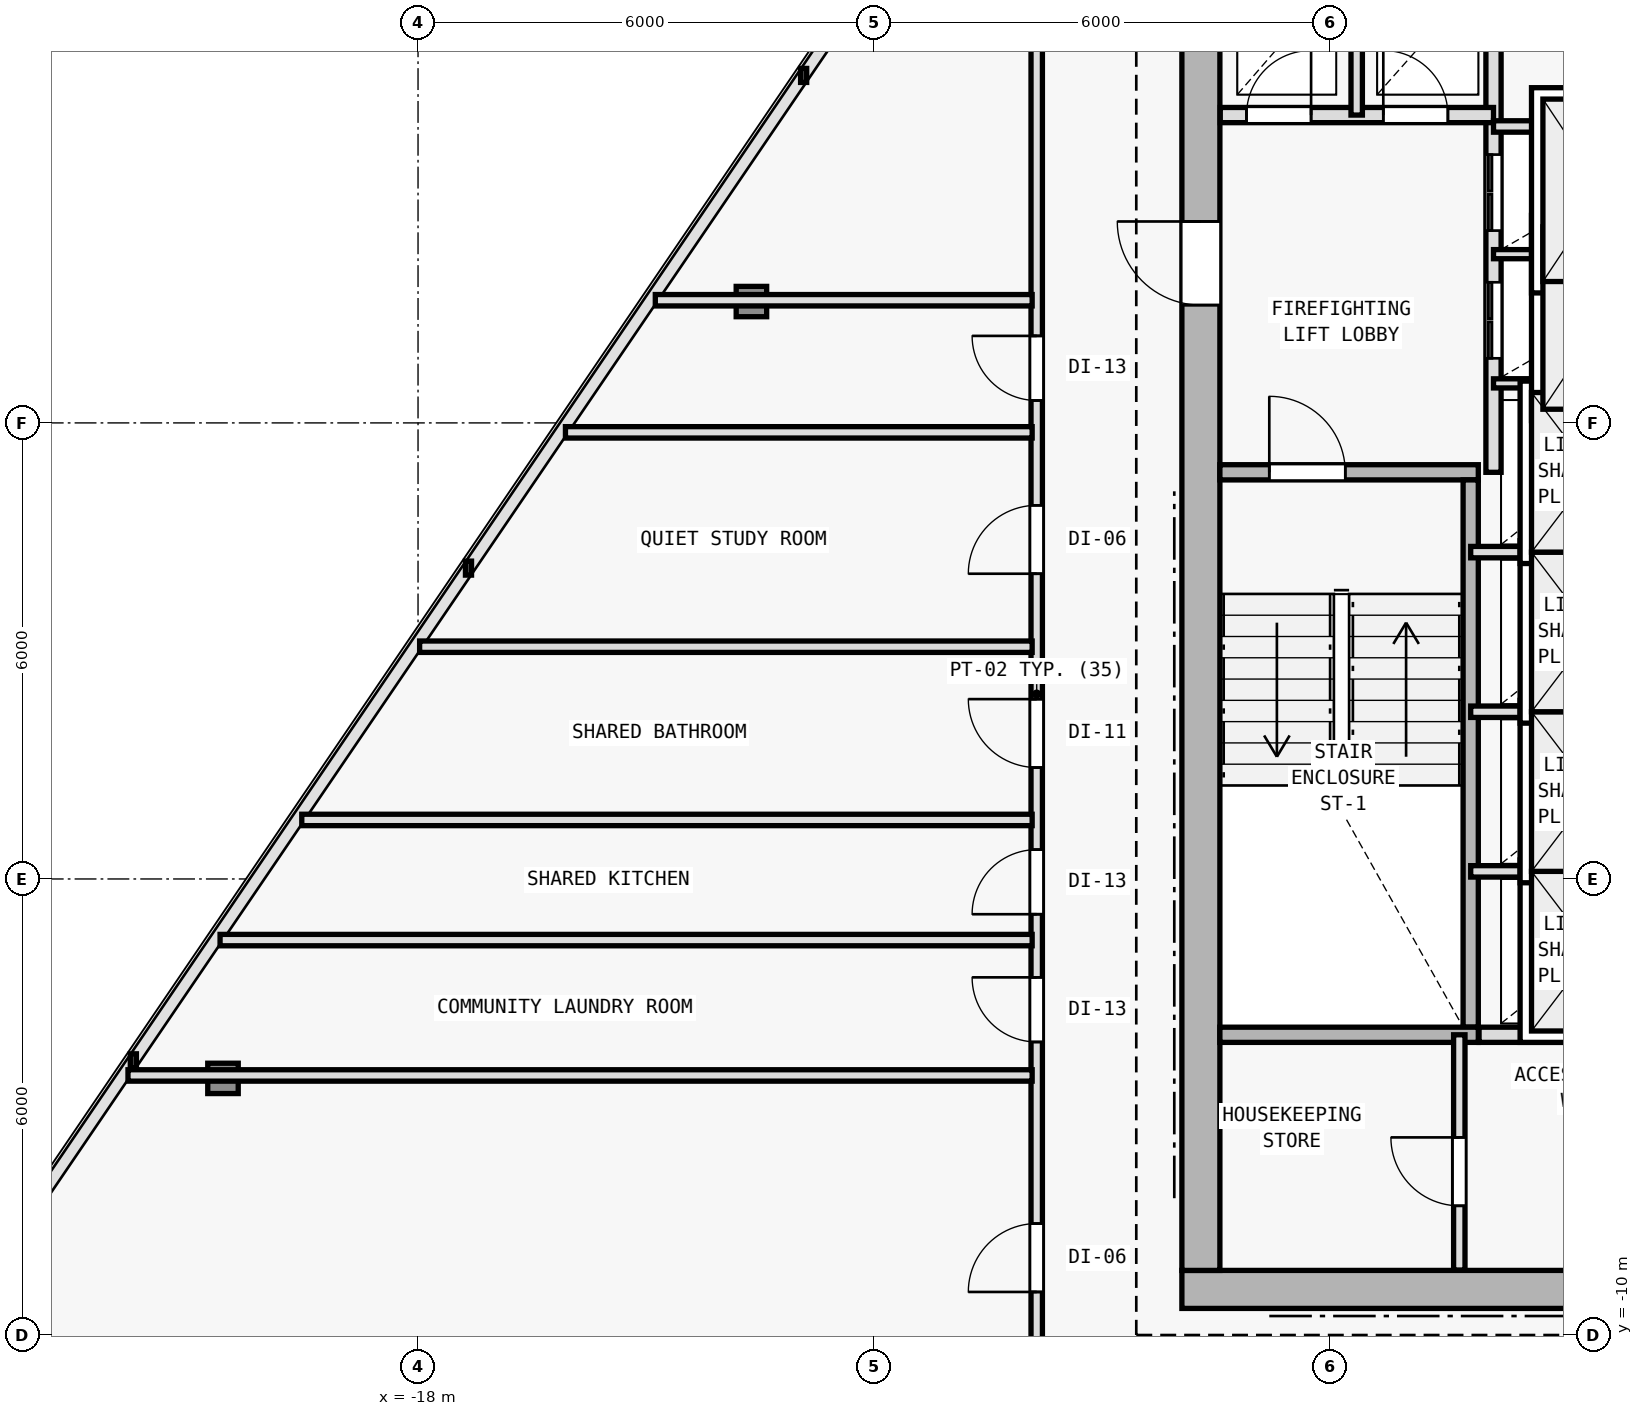
"""IFC4 building model, lengths in metres.
Left out: names, types, materials, properties, quantities, classifications, styles, units other than length and angle.
Written with IfcOpenShell. Run it as: python <this file> out.ifc"""

import sys

from ifc_helpers import new_model, si_unit, direction, frame, frame_2d, origin, origin_2d, place, context, subcontext, project, spatial, rectangle, i_section, extrude, element, fill, save


model = new_model("IFC4")
c1 = context("Model", 3, precision=1e-05, world=origin(), true_north=direction((0.0, 1.0)))
c2 = subcontext(c1, "Body", "Model", "MODEL_VIEW")
j1 = project(units=[si_unit("LENGTHUNIT", "METRE"), si_unit("PLANEANGLEUNIT", "RADIAN")], contexts=[c1])
p1 = place(None, origin())
s1 = spatial("IfcSite", under=j1, at=p1, CompositionType="ELEMENT")
p2 = place(p1, origin())
s2 = spatial("IfcBuilding", under=s1, at=p2, CompositionType="ELEMENT")
p3 = place(p2, frame((0.0, 0.0, 181.8)))
s3 = spatial("IfcBuildingStorey", under=s2, at=p3, CompositionType="ELEMENT", Elevation=181.8)
for number, where, z_axis, x_axis in (
    (1, (-7.7, -9.4, 0.0), (0.0, 0.0, 1.0), (1.0, 0.0, 0.0)),
    (2, (-7.7, 2.0, 0.0), (0.0, 0.0, 1.0), (1.0, 0.0, 0.0)),
):
    element("IfcColumn", number, at=place(p3, frame(where, z_axis=z_axis, x_axis=x_axis)), inside=s3, PredefinedType="COLUMN", context=c2, shape_type="SweptSolid", body=[
        extrude(i_section(OverallWidth=0.404, OverallDepth=0.407, WebThickness=0.017, FlangeThickness=0.028, FilletRadius=0.015, at=origin_2d()), origin(), (0.0, 0.0, 1.0), 3.6),
    ])
p4 = place(p3, frame((-13.614, 3.597, 0.005), z_axis=(0.01700241672, 0.009521353363, 0.999810112799), x_axis=(-0.488603368932, 0.87250601595, 0.0)))
e3 = element("IfcColumn", 3, at=p4, inside=s3, PredefinedType="COLUMN", context=c2, shape_type="SweptSolid", body=[
    extrude(i_section(OverallWidth=0.401, OverallDepth=0.399, WebThickness=0.016, FlangeThickness=0.025, FilletRadius=0.015, at=origin_2d()), origin(), (0.0, 0.0, 1.0), 3.59),
])
p5 = place(p3, frame((-20.566, -6.624, 0.005), z_axis=(0.025222449659, 0.021619242565, 0.999448065876), x_axis=(-0.650791373456, 0.759256602365, 0.0)))
e4 = element("IfcColumn", 4, at=p5, inside=s3, PredefinedType="COLUMN", context=c2, shape_type="SweptSolid", body=[
    extrude(i_section(OverallWidth=0.401, OverallDepth=0.399, WebThickness=0.016, FlangeThickness=0.025, FilletRadius=0.015, at=origin_2d()), origin(), (0.0, 0.0, 1.0), 3.591),
])
p6 = place(p3, frame((-7.95, -9.4, 0.0), z_axis=(0.0, 0.0, 1.0), x_axis=(1.0, 0.0, 0.0)))
e5 = element("IfcWall", 5, at=p6, inside=s3, PredefinedType="SHEAR", context=c2, shape_type="SweptSolid", body=[
    extrude(rectangle(XDim=15.9, YDim=0.5, at=frame_2d((7.95, 0.0))), origin(), (0.0, 0.0, 1.0), 3.28),
])
p7 = place(p6, frame((9.6, 0.0, 0.0)))
e6 = element("IfcOpeningElement", 6, at=p7, cuts=e5, PredefinedType="OPENING", context=c2, shape_type="SweptSolid", body=[
    extrude(rectangle(XDim=1.5, YDim=2.2, at=frame_2d((0.75, 1.1))), frame((0.0, 0.26, 0.0), z_axis=(0.0, -1.0, 0.0), x_axis=(1.0, 0.0, 0.0)), (0.0, 0.0, 1.0), 0.52),
])
p8 = place(p3, frame((-7.7, -9.15, 0.0), z_axis=(0.0, 0.0, 1.0), x_axis=(0.0, 1.0, 0.0)))
e7 = element("IfcWall", 7, at=p8, inside=s3, PredefinedType="SHEAR", context=c2, shape_type="SweptSolid", body=[
    extrude(rectangle(XDim=19.1, YDim=0.5, at=frame_2d((9.55, 0.0))), origin(), (0.0, 0.0, 1.0), 3.28),
])
p9 = place(p8, frame((12.7, 0.0, 0.0)))
e8 = element("IfcOpeningElement", 8, at=p9, cuts=e7, PredefinedType="OPENING", context=c2, shape_type="SweptSolid", body=[
    extrude(rectangle(XDim=1.1, YDim=2.15, at=frame_2d((0.55, 1.075))), frame((0.0, 0.26, 0.0), z_axis=(0.0, -1.0, 0.0), x_axis=(1.0, 0.0, 0.0)), (0.0, 0.0, 1.0), 0.52),
])
p10 = place(p3, frame((-7.45, 1.35, 0.0), z_axis=(0.0, 0.0, 1.0), x_axis=(1.0, 0.0, 0.0)))
e9 = element("IfcWall", 9, at=p10, inside=s3, PredefinedType="SOLIDWALL", context=c2, shape_type="SweptSolid", body=[
    extrude(rectangle(XDim=3.4, YDim=0.2, at=frame_2d((1.7, 0.0))), origin(), (0.0, 0.0, 1.0), 3.28),
])
p11 = place(p10, frame((0.65, 0.0, 0.0)))
e10 = element("IfcOpeningElement", 10, at=p11, cuts=e9, PredefinedType="OPENING", context=c2, shape_type="SweptSolid", body=[
    extrude(rectangle(XDim=1.0, YDim=2.15, at=frame_2d((0.5, 1.075))), frame((0.0, 0.11, 0.0), z_axis=(0.0, -1.0, 0.0), x_axis=(1.0, 0.0, 0.0)), (0.0, 0.0, 1.0), 0.22),
])
p12 = place(p3, frame((-4.15, -5.95, 0.0), z_axis=(0.0, 0.0, 1.0), x_axis=(0.0, 1.0, 0.0)))
e11 = element("IfcWall", 11, at=p12, inside=s3, PredefinedType="SOLIDWALL", context=c2, shape_type="SweptSolid", body=[
    extrude(rectangle(XDim=7.2, YDim=0.2, at=frame_2d((3.6, 0.0))), origin(), (0.0, 0.0, 1.0), 3.28),
])
p13 = place(p3, frame((-3.85, 1.35, 0.0), z_axis=(0.0, 0.0, 1.0), x_axis=(0.0, 1.0, 0.0)))
e12 = element("IfcWall", 12, at=p13, inside=s3, PredefinedType="SOLIDWALL", context=c2, shape_type="SweptSolid", body=[
    extrude(rectangle(XDim=8.595, YDim=0.2, at=frame_2d((4.297, 0.0))), origin(), (0.0, 0.0, 1.0), 3.28),
])
p14 = place(p13, frame((1.5, 0.0, 0.0)))
e13 = element("IfcOpeningElement", 13, at=p14, cuts=e12, PredefinedType="OPENING", context=c2, shape_type="SweptSolid", body=[
    extrude(rectangle(XDim=1.0, YDim=2.15, at=frame_2d((0.5, 1.075))), frame((0.0, 0.11, 0.0), z_axis=(0.0, -1.0, 0.0), x_axis=(1.0, 0.0, 0.0)), (0.0, 0.0, 1.0), 0.22),
])
p15 = place(p13, frame((3.18, 0.0, 0.0)))
e14 = element("IfcOpeningElement", 14, at=p15, cuts=e12, PredefinedType="OPENING", context=c2, shape_type="SweptSolid", body=[
    extrude(rectangle(XDim=1.0, YDim=2.15, at=frame_2d((0.5, 1.075))), frame((0.0, 0.11, 0.0), z_axis=(0.0, -1.0, 0.0), x_axis=(1.0, 0.0, 0.0)), (0.0, 0.0, 1.0), 0.22),
])
p16 = place(p3, frame((-7.445, 6.05, 0.0), z_axis=(0.0, 0.0, 1.0), x_axis=(1.0, 0.0, 0.0)))
e15 = element("IfcWall", 15, at=p16, inside=s3, PredefinedType="SOLIDWALL", context=c2, shape_type="SweptSolid", body=[
    extrude(rectangle(XDim=3.595, YDim=0.2, at=frame_2d((1.797, 0.0))), origin(), (0.0, 0.0, 1.0), 3.28),
])
p17 = place(p16, frame((0.345, 0.0, 0.0)))
e16 = element("IfcOpeningElement", 16, at=p17, cuts=e15, PredefinedType="OPENING", context=c2, shape_type="SweptSolid", body=[
    extrude(rectangle(XDim=0.85, YDim=2.1, at=frame_2d((0.425, 1.05))), frame((0.0, 0.11, 0.0), z_axis=(0.0, -1.0, 0.0), x_axis=(1.0, 0.0, 0.0)), (0.0, 0.0, 1.0), 0.22),
])
p18 = place(p16, frame((2.145, 0.0, 0.0)))
e17 = element("IfcOpeningElement", 17, at=p18, cuts=e15, PredefinedType="OPENING", context=c2, shape_type="SweptSolid", body=[
    extrude(rectangle(XDim=0.85, YDim=2.1, at=frame_2d((0.425, 1.05))), frame((0.0, 0.11, 0.0), z_axis=(0.0, -1.0, 0.0), x_axis=(1.0, 0.0, 0.0)), (0.0, 0.0, 1.0), 0.22),
])
p19 = place(p3, frame((-5.65, 6.05, 0.0), z_axis=(0.0, 0.0, 1.0), x_axis=(0.0, 1.0, 0.0)))
e18 = element("IfcWall", 18, at=p19, inside=s3, PredefinedType="PARTITIONING", context=c2, shape_type="SweptSolid", body=[
    extrude(rectangle(XDim=2.05, YDim=0.15, at=frame_2d((1.025, 0.0))), origin(), (0.0, 0.0, 1.0), 3.28),
])
for number, where, z_axis, x_axis in (
    (19, (-3.85, 2.52, 0.0), (0.0, 0.0, 1.0), (1.0, 0.0, 0.0)),
    (20, (-3.85, 4.22, 0.0), (0.0, 0.0, 1.0), (1.0, 0.0, 0.0)),
):
    element("IfcWall", number, at=place(p3, frame(where, z_axis=z_axis, x_axis=x_axis)), inside=s3, PredefinedType="PARTITIONING", context=c2, shape_type="SweptSolid", body=[
        extrude(rectangle(XDim=2.9, YDim=0.12, at=frame_2d((1.45, 0.0))), origin(), (0.0, 0.0, 1.0), 3.28),
    ])
p20 = place(p3, frame((-3.85, 5.9, 0.0), z_axis=(0.0, 0.0, 1.0), x_axis=(1.0, 0.0, 0.0)))
e21 = element("IfcWall", 21, at=p20, inside=s3, PredefinedType="PARTITIONING", context=c2, shape_type="SweptSolid", body=[
    extrude(rectangle(XDim=2.9, YDim=0.15, at=frame_2d((1.45, 0.0))), origin(), (0.0, 0.0, 1.0), 3.28),
])
for number, where, z_axis, x_axis in (
    (22, (-4.15, -3.9, 0.0), (0.0, 0.0, 1.0), (1.0, 0.0, 0.0)),
    (23, (-4.15, -1.8, 0.0), (0.0, 0.0, 1.0), (1.0, 0.0, 0.0)),
    (24, (-4.15, 0.3, 0.0), (0.0, 0.0, 1.0), (1.0, 0.0, 0.0)),
):
    element("IfcWall", number, at=place(p3, frame(where, z_axis=z_axis, x_axis=x_axis)), inside=s3, PredefinedType="PARTITIONING", context=c2, shape_type="SweptSolid", body=[
        extrude(rectangle(XDim=2.9, YDim=0.15, at=frame_2d((1.45, 0.0))), origin(), (0.0, 0.0, 1.0), 3.28),
    ])
p21 = place(p3, frame((-7.45, -6.05, 0.0), z_axis=(0.0, 0.0, 1.0), x_axis=(1.0, 0.0, 0.0)))
e25 = element("IfcWall", 25, at=p21, inside=s3, PredefinedType="SOLIDWALL", context=c2, shape_type="SweptSolid", body=[
    extrude(rectangle(XDim=3.4, YDim=0.2, at=frame_2d((1.7, 0.0))), origin(), (0.0, 0.0, 1.0), 3.28),
])
p22 = place(p3, frame((-4.04, -6.05, 0.0), z_axis=(0.0, 0.0, 1.0), x_axis=(1.0, 0.0, 0.0)))
e26 = element("IfcWall", 26, at=p22, inside=s3, PredefinedType="SOLIDWALL", context=c2, shape_type="SweptSolid", body=[
    extrude(rectangle(XDim=2.79, YDim=0.2, at=frame_2d((1.395, 0.0))), origin(), (0.0, 0.0, 1.0), 3.28),
])
p23 = place(p3, frame((-4.3, -9.145, 0.0), z_axis=(0.0, 0.0, 1.0), x_axis=(0.0, 1.0, 0.0)))
e27 = element("IfcWall", 27, at=p23, inside=s3, PredefinedType="PARTITIONING", context=c2, shape_type="SweptSolid", body=[
    extrude(rectangle(XDim=3.095, YDim=0.15, at=frame_2d((1.547, 0.0))), origin(), (0.0, 0.0, 1.0), 3.28),
])
p24 = place(p23, frame((0.845, 0.0, 0.0)))
e28 = element("IfcOpeningElement", 28, at=p24, cuts=e27, PredefinedType="OPENING", context=c2, shape_type="SweptSolid", body=[
    extrude(rectangle(XDim=0.9, YDim=2.1, at=frame_2d((0.45, 1.05))), frame((0.0, 0.085, 0.0), z_axis=(0.0, -1.0, 0.0), x_axis=(1.0, 0.0, 0.0)), (0.0, 0.0, 1.0), 0.17),
])
p25 = place(p3, frame((-9.86, -11.56, 0.0), z_axis=(0.0, 0.0, 1.0), x_axis=(0.0, 1.0, 0.0)))
e29 = element("IfcWall", 29, at=p25, inside=s3, PredefinedType="PARTITIONING", context=c2, shape_type="SweptSolid", body=[
    extrude(rectangle(XDim=19.986, YDim=0.15, at=frame_2d((9.993, 0.0))), origin(), (0.0, 0.0, 1.0), 2.755),
])
p26 = place(p25, frame((9.026, 0.0, 0.0)))
e30 = element("IfcOpeningElement", 30, at=p26, cuts=e29, PredefinedType="OPENING", context=c2, shape_type="SweptSolid", body=[
    extrude(rectangle(XDim=0.9, YDim=2.1, at=frame_2d((0.45, 1.05))), frame((0.0, 0.085, 0.0), z_axis=(0.0, -1.0, 0.0), x_axis=(1.0, 0.0, 0.0)), (0.0, 0.0, 1.0), 0.17),
])
p27 = place(p25, frame((7.096, 0.0, 0.0)))
e31 = element("IfcOpeningElement", 31, at=p27, cuts=e29, PredefinedType="OPENING", context=c2, shape_type="SweptSolid", body=[
    extrude(rectangle(XDim=0.85, YDim=2.1, at=frame_2d((0.425, 1.05))), frame((0.0, 0.085, 0.0), z_axis=(0.0, -1.0, 0.0), x_axis=(1.0, 0.0, 0.0)), (0.0, 0.0, 1.0), 0.17),
])
p28 = place(p25, frame((5.416, 0.0, 0.0)))
e32 = element("IfcOpeningElement", 32, at=p28, cuts=e29, PredefinedType="OPENING", context=c2, shape_type="SweptSolid", body=[
    extrude(rectangle(XDim=0.85, YDim=2.1, at=frame_2d((0.425, 1.05))), frame((0.0, 0.085, 0.0), z_axis=(0.0, -1.0, 0.0), x_axis=(1.0, 0.0, 0.0)), (0.0, 0.0, 1.0), 0.17),
])
p29 = place(p25, frame((2.127, 0.0, 0.0)))
e33 = element("IfcOpeningElement", 33, at=p29, cuts=e29, PredefinedType="OPENING", context=c2, shape_type="SweptSolid", body=[
    extrude(rectangle(XDim=0.9, YDim=2.1, at=frame_2d((0.45, 1.05))), frame((0.0, 0.085, 0.0), z_axis=(0.0, -1.0, 0.0), x_axis=(1.0, 0.0, 0.0)), (0.0, 0.0, 1.0), 0.17),
])
p30 = place(p25, frame((13.855, 0.0, 0.0)))
e34 = element("IfcOpeningElement", 34, at=p30, cuts=e29, PredefinedType="OPENING", context=c2, shape_type="SweptSolid", body=[
    extrude(rectangle(XDim=0.85, YDim=2.1, at=frame_2d((0.425, 1.05))), frame((0.0, 0.085, 0.0), z_axis=(0.0, -1.0, 0.0), x_axis=(1.0, 0.0, 0.0)), (0.0, 0.0, 1.0), 0.17),
])
p31 = place(p25, frame((11.576, 0.0, 0.0)))
e35 = element("IfcOpeningElement", 35, at=p31, cuts=e29, PredefinedType="OPENING", context=c2, shape_type="SweptSolid", body=[
    extrude(rectangle(XDim=0.9, YDim=2.1, at=frame_2d((0.45, 1.05))), frame((0.0, 0.085, 0.0), z_axis=(0.0, -1.0, 0.0), x_axis=(1.0, 0.0, 0.0)), (0.0, 0.0, 1.0), 0.17),
])
p32 = place(p3, frame((-9.92, 3.614, 0.0), z_axis=(0.0, 0.0, 1.0), x_axis=(-1.0, 0.0, 0.0)))
e36 = element("IfcWall", 36, at=p32, inside=s3, PredefinedType="PARTITIONING", context=c2, shape_type="SweptSolid", body=[
    extrude(rectangle(XDim=4.958, YDim=0.15, at=frame_2d((2.479, 0.0))), origin(), (0.0, 0.0, 1.0), 2.865),
])
p33 = place(p3, frame((-9.92, -6.585, 0.0), z_axis=(0.0, 0.0, 1.0), x_axis=(-1.0, 0.0, 0.0)))
e37 = element("IfcWall", 37, at=p33, inside=s3, PredefinedType="PARTITIONING", context=c2, shape_type="SweptSolid", body=[
    extrude(rectangle(XDim=11.896, YDim=0.15, at=frame_2d((5.948, 0.0))), origin(), (0.0, 0.0, 1.0), 2.755),
])
p34 = place(p3, frame((-9.92, -0.944, 0.0), z_axis=(0.0, 0.0, 1.0), x_axis=(-1.0, 0.0, 0.0)))
e38 = element("IfcWall", 38, at=p34, inside=s3, PredefinedType="PARTITIONING", context=c2, shape_type="SweptSolid", body=[
    extrude(rectangle(XDim=8.059, YDim=0.15, at=frame_2d((4.03, 0.0))), origin(), (0.0, 0.0, 1.0), 2.855),
])
p35 = place(p3, frame((-9.92, -3.223, 0.0), z_axis=(0.0, 0.0, 1.0), x_axis=(-1.0, 0.0, 0.0)))
e39 = element("IfcWall", 39, at=p35, inside=s3, PredefinedType="PARTITIONING", context=c2, shape_type="SweptSolid", body=[
    extrude(rectangle(XDim=9.61, YDim=0.15, at=frame_2d((4.805, 0.0))), origin(), (0.0, 0.0, 1.0), 2.855),
])
p36 = place(p3, frame((-9.92, 1.876, 0.0), z_axis=(0.0, 0.0, 1.0), x_axis=(-1.0, 0.0, 0.0)))
e40 = element("IfcWall", 40, at=p36, inside=s3, PredefinedType="PARTITIONING", context=c2, shape_type="SweptSolid", body=[
    extrude(rectangle(XDim=6.141, YDim=0.15, at=frame_2d((3.07, 0.0))), origin(), (0.0, 0.0, 1.0), 2.855),
])
p37 = place(p3, frame((-9.92, -4.804, 0.0), z_axis=(0.0, 0.0, 1.0), x_axis=(-1.0, 0.0, 0.0)))
e41 = element("IfcWall", 41, at=p37, inside=s3, PredefinedType="PARTITIONING", context=c2, shape_type="SweptSolid", body=[
    extrude(rectangle(XDim=10.685, YDim=0.15, at=frame_2d((5.342, 0.0))), origin(), (0.0, 0.0, 1.0), 2.855),
])
p38 = place(p9, origin())
e42 = element("IfcDoor", 42, at=p38, inside=s3, OperationType="SINGLE_SWING_RIGHT", PredefinedType="DOOR", context=c2, shape_type="SweptSolid", body=[
    extrude(rectangle(XDim=1.1, YDim=2.15, at=frame_2d((0.55, 1.075))), frame((0.0, 0.025, 0.0), z_axis=(0.0, -1.0, 0.0), x_axis=(1.0, 0.0, 0.0)), (0.0, 0.0, 1.0), 0.05),
])
fill(e8, e42)
p39 = place(p11, origin())
e43 = element("IfcDoor", 43, at=p39, inside=s3, OperationType="SINGLE_SWING_LEFT", PredefinedType="DOOR", context=c2, shape_type="SweptSolid", body=[
    extrude(rectangle(XDim=1.0, YDim=2.15, at=frame_2d((0.5, 1.075))), frame((0.0, 0.025, 0.0), z_axis=(0.0, -1.0, 0.0), x_axis=(1.0, 0.0, 0.0)), (0.0, 0.0, 1.0), 0.05),
])
fill(e10, e43)
p40 = place(p17, origin())
e44 = element("IfcDoor", 44, at=p40, inside=s3, OperationType="SINGLE_SWING_RIGHT", PredefinedType="DOOR", context=c2, shape_type="SweptSolid", body=[
    extrude(rectangle(XDim=0.85, YDim=2.1, at=frame_2d((0.425, 1.05))), frame((0.0, 0.025, 0.0), z_axis=(0.0, -1.0, 0.0), x_axis=(1.0, 0.0, 0.0)), (0.0, 0.0, 1.0), 0.05),
])
fill(e16, e44)
p41 = place(p18, origin())
e45 = element("IfcDoor", 45, at=p41, inside=s3, OperationType="SINGLE_SWING_LEFT", PredefinedType="DOOR", context=c2, shape_type="SweptSolid", body=[
    extrude(rectangle(XDim=0.85, YDim=2.1, at=frame_2d((0.425, 1.05))), frame((0.0, 0.025, 0.0), z_axis=(0.0, -1.0, 0.0), x_axis=(1.0, 0.0, 0.0)), (0.0, 0.0, 1.0), 0.05),
])
fill(e17, e45)
p42 = place(p14, origin())
e46 = element("IfcDoor", 46, at=p42, inside=s3, OperationType="DOUBLE_DOOR_SLIDING", PredefinedType="DOOR", context=c2, shape_type="SweptSolid", body=[
    extrude(rectangle(XDim=1.0, YDim=2.15, at=frame_2d((0.5, 1.075))), frame((0.0, 0.025, 0.0), z_axis=(0.0, -1.0, 0.0), x_axis=(1.0, 0.0, 0.0)), (0.0, 0.0, 1.0), 0.05),
])
fill(e13, e46)
p43 = place(p15, origin())
e47 = element("IfcDoor", 47, at=p43, inside=s3, OperationType="DOUBLE_DOOR_SLIDING", PredefinedType="DOOR", context=c2, shape_type="SweptSolid", body=[
    extrude(rectangle(XDim=1.0, YDim=2.15, at=frame_2d((0.5, 1.075))), frame((0.0, 0.025, 0.0), z_axis=(0.0, -1.0, 0.0), x_axis=(1.0, 0.0, 0.0)), (0.0, 0.0, 1.0), 0.05),
])
fill(e14, e47)
p44 = place(p24, origin())
e48 = element("IfcDoor", 48, at=p44, inside=s3, OperationType="SINGLE_SWING_RIGHT", PredefinedType="DOOR", context=c2, shape_type="SweptSolid", body=[
    extrude(rectangle(XDim=0.9, YDim=2.1, at=frame_2d((0.45, 1.05))), frame((0.0, 0.025, 0.0), z_axis=(0.0, -1.0, 0.0), x_axis=(1.0, 0.0, 0.0)), (0.0, 0.0, 1.0), 0.05),
])
fill(e28, e48)
p45 = place(p26, origin())
e49 = element("IfcDoor", 49, at=p45, inside=s3, OperationType="SINGLE_SWING_RIGHT", PredefinedType="DOOR", context=c2, shape_type="SweptSolid", body=[
    extrude(rectangle(XDim=0.9, YDim=2.1, at=frame_2d((0.45, 1.05))), frame((0.0, 0.025, 0.0), z_axis=(0.0, -1.0, 0.0), x_axis=(1.0, 0.0, 0.0)), (0.0, 0.0, 1.0), 0.05),
])
fill(e30, e49)
p46 = place(p27, origin())
e50 = element("IfcDoor", 50, at=p46, inside=s3, OperationType="SINGLE_SWING_LEFT", PredefinedType="DOOR", context=c2, shape_type="SweptSolid", body=[
    extrude(rectangle(XDim=0.85, YDim=2.1, at=frame_2d((0.425, 1.05))), frame((0.0, 0.025, 0.0), z_axis=(0.0, -1.0, 0.0), x_axis=(1.0, 0.0, 0.0)), (0.0, 0.0, 1.0), 0.05),
])
fill(e31, e50)
p47 = place(p28, origin())
e51 = element("IfcDoor", 51, at=p47, inside=s3, OperationType="SINGLE_SWING_RIGHT", PredefinedType="DOOR", context=c2, shape_type="SweptSolid", body=[
    extrude(rectangle(XDim=0.85, YDim=2.1, at=frame_2d((0.425, 1.05))), frame((0.0, 0.025, 0.0), z_axis=(0.0, -1.0, 0.0), x_axis=(1.0, 0.0, 0.0)), (0.0, 0.0, 1.0), 0.05),
])
fill(e32, e51)
p48 = place(p29, origin())
e52 = element("IfcDoor", 52, at=p48, inside=s3, OperationType="SINGLE_SWING_LEFT", PredefinedType="DOOR", context=c2, shape_type="SweptSolid", body=[
    extrude(rectangle(XDim=0.9, YDim=2.1, at=frame_2d((0.45, 1.05))), frame((0.0, 0.025, 0.0), z_axis=(0.0, -1.0, 0.0), x_axis=(1.0, 0.0, 0.0)), (0.0, 0.0, 1.0), 0.05),
])
fill(e33, e52)
p49 = place(p30, origin())
e53 = element("IfcDoor", 53, at=p49, inside=s3, OperationType="SINGLE_SWING_RIGHT", PredefinedType="DOOR", context=c2, shape_type="SweptSolid", body=[
    extrude(rectangle(XDim=0.85, YDim=2.1, at=frame_2d((0.425, 1.05))), frame((0.0, 0.025, 0.0), z_axis=(0.0, -1.0, 0.0), x_axis=(1.0, 0.0, 0.0)), (0.0, 0.0, 1.0), 0.05),
])
fill(e34, e53)
p50 = place(p31, origin())
e54 = element("IfcDoor", 54, at=p50, inside=s3, OperationType="SINGLE_SWING_LEFT", PredefinedType="DOOR", context=c2, shape_type="SweptSolid", body=[
    extrude(rectangle(XDim=0.9, YDim=2.1, at=frame_2d((0.45, 1.05))), frame((0.0, 0.025, 0.0), z_axis=(0.0, -1.0, 0.0), x_axis=(1.0, 0.0, 0.0)), (0.0, 0.0, 1.0), 0.05),
])
fill(e35, e54)
save(model, sys.argv[1])
